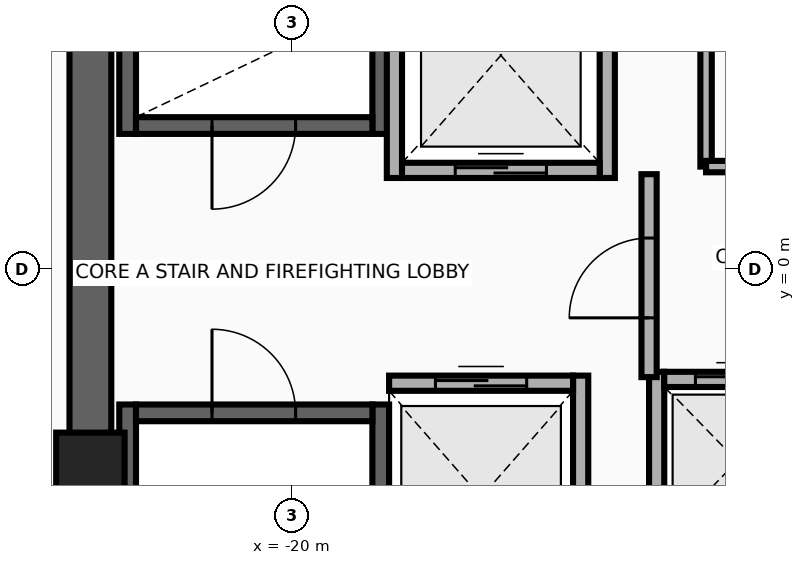
"""IFC4 building model, lengths in metres.
Left out: names, types, materials, properties, quantities, classifications, styles, units other than length and angle.
Written with IfcOpenShell. Run it as: python <this file> out.ifc"""

import sys

from ifc_helpers import new_model, si_unit, direction, frame, frame_2d, origin, origin_2d, place, context, subcontext, project, spatial, rectangle, extrude, source, transform, mapped, element, fill, save


model = new_model("IFC4")
c1 = context("Model", 3, precision=1e-05, world=origin(), true_north=direction((0.0, 1.0)))
c2 = subcontext(c1, "Body", "Model", "MODEL_VIEW")
j1 = project(units=[si_unit("LENGTHUNIT", "METRE"), si_unit("PLANEANGLEUNIT", "RADIAN")], contexts=[c1])
p1 = place(None, origin())
s1 = spatial("IfcSite", under=j1, at=p1, CompositionType="ELEMENT")
p2 = place(p1, origin())
s2 = spatial("IfcBuilding", under=s1, at=p2, CompositionType="ELEMENT")
p3 = place(p2, frame((0.0, 0.0, 209.0)))
s3 = spatial("IfcBuildingStorey", under=s2, at=p3, CompositionType="ELEMENT", Elevation=209.0)
for number, where, z_axis, x_axis in (
    (1, (-22.16, 1.78, 0.0), (0.0, 0.0, 1.0), (0.0, 1.0, 0.0)),
    (2, (-18.83, 1.78, 0.0), (0.0, 0.0, 1.0), (0.0, 1.0, 0.0)),
):
    element("IfcWall", number, at=place(p3, frame(where, z_axis=z_axis, x_axis=x_axis)), inside=s3, PredefinedType="SHEAR", context=c2, shape_type="SweptSolid", body=[
        extrude(rectangle(XDim=8.745, YDim=0.22, at=frame_2d((4.373, 0.0))), origin(), (0.0, 0.0, 1.0), 3.26),
    ])
p4 = place(p3, frame((-22.05, 1.89, 0.0), z_axis=(0.0, 0.0, 1.0), x_axis=(1.0, 0.0, 0.0)))
e3 = element("IfcWall", 3, at=p4, inside=s3, PredefinedType="SHEAR", context=c2, shape_type="SweptSolid", body=[
    extrude(rectangle(XDim=3.11, YDim=0.22, at=frame_2d((1.555, 0.0))), origin(), (0.0, 0.0, 1.0), 3.26),
])
p5 = place(p4, frame((1.0, 0.0, 0.0)))
e4 = element("IfcOpeningElement", 4, at=p5, cuts=e3, PredefinedType="OPENING", context=c2, shape_type="SweptSolid", body=[
    extrude(rectangle(XDim=1.1, YDim=2.15, at=frame_2d((0.55, 1.075))), frame((0.0, 0.125, 0.0), z_axis=(0.0, -1.0, 0.0), x_axis=(1.0, 0.0, 0.0)), (0.0, 0.0, 1.0), 0.25),
])
for number, where, z_axis, x_axis in (
    (5, (-22.16, -10.525, 0.0), (0.0, 0.0, 1.0), (0.0, 1.0, 0.0)),
    (6, (-18.83, -10.525, 0.0), (0.0, 0.0, 1.0), (0.0, 1.0, 0.0)),
):
    element("IfcWall", number, at=place(p3, frame(where, z_axis=z_axis, x_axis=x_axis)), inside=s3, PredefinedType="SHEAR", context=c2, shape_type="SweptSolid", body=[
        extrude(rectangle(XDim=8.745, YDim=0.22, at=frame_2d((4.373, 0.0))), origin(), (0.0, 0.0, 1.0), 3.26),
    ])
p6 = place(p3, frame((-22.05, -1.89, 0.0), z_axis=(0.0, 0.0, 1.0), x_axis=(1.0, 0.0, 0.0)))
e7 = element("IfcWall", 7, at=p6, inside=s3, PredefinedType="SHEAR", context=c2, shape_type="SweptSolid", body=[
    extrude(rectangle(XDim=3.11, YDim=0.22, at=frame_2d((1.555, 0.0))), origin(), (0.0, 0.0, 1.0), 3.26),
])
p7 = place(p6, frame((1.0, 0.0, 0.0)))
e8 = element("IfcOpeningElement", 8, at=p7, cuts=e7, PredefinedType="OPENING", context=c2, shape_type="SweptSolid", body=[
    extrude(rectangle(XDim=1.1, YDim=2.15, at=frame_2d((0.55, 1.075))), frame((0.0, 0.125, 0.0), z_axis=(0.0, -1.0, 0.0), x_axis=(1.0, 0.0, 0.0)), (0.0, 0.0, 1.0), 0.25),
])
p8 = place(p3, frame((-22.65, -11.075, 0.0), z_axis=(0.0, 0.0, 1.0), x_axis=(0.0, 1.0, 0.0)))
e9 = element("IfcWall", 9, at=p8, inside=s3, PredefinedType="SHEAR", context=c2, shape_type="SweptSolid", body=[
    extrude(rectangle(XDim=22.15, YDim=0.55, at=frame_2d((11.075, 0.0))), origin(), (0.0, 0.0, 1.0), 3.26),
])
m1 = source(origin(), c2, "Body", "SweptSolid", [
    extrude(rectangle(XDim=0.9, YDim=0.9, at=origin_2d()), origin(), (0.0, 0.0, 1.0), 3.5),
])
p9 = place(p3, frame((-22.65, -2.6, 0.0), z_axis=(0.0, 0.0, 1.0), x_axis=(1.0, 0.0, 0.0)))
e10 = element("IfcColumn", 10, at=p9, inside=s3, PredefinedType="COLUMN", context=c2, shape_type="MappedRepresentation", body=[
    mapped(m1, transform((0.0, 0.0, 0.0), x_axis=(1.0, 0.0, 0.0), y_axis=(0.0, 1.0, 0.0), z_axis=(0.0, 0.0, 1.0), scale=1.0)),
])
for number, where, z_axis, x_axis in (
    (11, (-18.65, 1.2, 0.0), (0.0, 0.0, 1.0), (0.0, 1.0, 0.0)),
    (12, (-15.85, 1.2, 0.0), (0.0, 0.0, 1.0), (0.0, 1.0, 0.0)),
):
    element("IfcWall", number, at=place(p3, frame(where, z_axis=z_axis, x_axis=x_axis)), inside=s3, PredefinedType="MOVABLE", context=c2, shape_type="SweptSolid", body=[
        extrude(rectangle(XDim=3.225, YDim=0.2, at=frame_2d((1.613, 0.0))), origin(), (0.0, 0.0, 1.0), 3.26),
    ])
p10 = place(p3, frame((-18.55, 1.3, 0.0), z_axis=(0.0, 0.0, 1.0), x_axis=(1.0, 0.0, 0.0)))
e13 = element("IfcWall", 13, at=p10, inside=s3, PredefinedType="MOVABLE", context=c2, shape_type="SweptSolid", body=[
    extrude(rectangle(XDim=2.6, YDim=0.2, at=frame_2d((1.3, 0.0))), origin(), (0.0, 0.0, 1.0), 3.26),
])
p11 = place(p10, frame((0.7, 0.0, 0.0)))
e14 = element("IfcOpeningElement", 14, at=p11, cuts=e13, PredefinedType="OPENING", context=c2, shape_type="SweptSolid", body=[
    extrude(rectangle(XDim=1.2, YDim=2.1, at=frame_2d((0.6, 1.05))), frame((0.0, 0.115, 0.0), z_axis=(0.0, -1.0, 0.0), x_axis=(1.0, 0.0, 0.0)), (0.0, 0.0, 1.0), 0.23),
])
p12 = place(p3, frame((-16.2, -4.6, 0.0), z_axis=(0.0, 0.0, 1.0), x_axis=(0.0, 1.0, 0.0)))
e15 = element("IfcWall", 15, at=p12, inside=s3, PredefinedType="MOVABLE", context=c2, shape_type="SweptSolid", body=[
    extrude(rectangle(XDim=3.2, YDim=0.2, at=frame_2d((1.6, 0.0))), origin(), (0.0, 0.0, 1.0), 3.26),
])
p13 = place(p3, frame((-18.72, -1.5, 0.0), z_axis=(0.0, 0.0, 1.0), x_axis=(1.0, 0.0, 0.0)))
e16 = element("IfcWall", 16, at=p13, inside=s3, PredefinedType="MOVABLE", context=c2, shape_type="SweptSolid", body=[
    extrude(rectangle(XDim=2.42, YDim=0.2, at=frame_2d((1.21, 0.0))), origin(), (0.0, 0.0, 1.0), 3.26),
])
p14 = place(p13, frame((0.61, 0.0, 0.0)))
e17 = element("IfcOpeningElement", 17, at=p14, cuts=e16, PredefinedType="OPENING", context=c2, shape_type="SweptSolid", body=[
    extrude(rectangle(XDim=1.2, YDim=2.1, at=frame_2d((0.6, 1.05))), frame((0.0, 0.115, 0.0), z_axis=(0.0, -1.0, 0.0), x_axis=(1.0, 0.0, 0.0)), (0.0, 0.0, 1.0), 0.23),
])
p15 = place(p3, frame((-15.2, -3.7, 0.0), z_axis=(0.0, 0.0, 1.0), x_axis=(0.0, 1.0, 0.0)))
e18 = element("IfcWall", 18, at=p15, inside=s3, PredefinedType="MOVABLE", context=c2, shape_type="SweptSolid", body=[
    extrude(rectangle(XDim=2.35, YDim=0.2, at=frame_2d((1.175, 0.0))), origin(), (0.0, 0.0, 1.0), 3.26),
])
p16 = place(p3, frame((-15.1, -1.45, 0.0), z_axis=(0.0, 0.0, 1.0), x_axis=(1.0, 0.0, 0.0)))
e19 = element("IfcWall", 19, at=p16, inside=s3, PredefinedType="MOVABLE", context=c2, shape_type="SweptSolid", body=[
    extrude(rectangle(XDim=1.92, YDim=0.2, at=frame_2d((0.96, 0.0))), origin(), (0.0, 0.0, 1.0), 3.26),
])
p17 = place(p16, frame((0.41, 0.0, 0.0)))
e20 = element("IfcOpeningElement", 20, at=p17, cuts=e19, PredefinedType="OPENING", context=c2, shape_type="SweptSolid", body=[
    extrude(rectangle(XDim=1.1, YDim=2.1, at=frame_2d((0.55, 1.05))), frame((0.0, 0.115, 0.0), z_axis=(0.0, -1.0, 0.0), x_axis=(1.0, 0.0, 0.0)), (0.0, 0.0, 1.0), 0.23),
])
p18 = place(p3, frame((-15.3, -1.42, 0.0), z_axis=(0.0, 0.0, 1.0), x_axis=(0.0, 1.0, 0.0)))
e21 = element("IfcWall", 21, at=p18, inside=s3, PredefinedType="PARTITIONING", context=c2, shape_type="SweptSolid", body=[
    extrude(rectangle(XDim=2.67, YDim=0.2, at=frame_2d((1.335, 0.0))), origin(), (0.0, 0.0, 1.0), 3.26),
])
p19 = place(p18, frame((0.78, 0.0, 0.0)))
e22 = element("IfcOpeningElement", 22, at=p19, cuts=e21, PredefinedType="OPENING", context=c2, shape_type="SweptSolid", body=[
    extrude(rectangle(XDim=1.05, YDim=2.15, at=frame_2d((0.525, 1.075))), frame((0.0, 0.115, 0.0), z_axis=(0.0, -1.0, 0.0), x_axis=(1.0, 0.0, 0.0)), (0.0, 0.0, 1.0), 0.23),
])
p20 = place(p3, frame((-14.55, 1.35, 0.0), z_axis=(0.0, 0.0, 1.0), x_axis=(0.0, 1.0, 0.0)))
e23 = element("IfcWall", 23, at=p20, inside=s3, PredefinedType="PARTITIONING", context=c2, shape_type="SweptSolid", body=[
    extrude(rectangle(XDim=1.95, YDim=0.15, at=frame_2d((0.975, 0.0))), origin(), (0.0, 0.0, 1.0), 3.26),
])
p21 = place(p3, frame((-14.55, 1.35, 0.0), z_axis=(0.0, 0.0, 1.0), x_axis=(1.0, 0.0, 0.0)))
e24 = element("IfcWall", 24, at=p21, inside=s3, PredefinedType="PARTITIONING", context=c2, shape_type="SweptSolid", body=[
    extrude(rectangle(XDim=1.4, YDim=0.15, at=frame_2d((0.7, 0.0))), origin(), (0.0, 0.0, 1.0), 3.26),
])
p22 = place(p21, frame((0.275, 0.0, 0.0)))
e25 = element("IfcOpeningElement", 25, at=p22, cuts=e24, PredefinedType="OPENING", context=c2, shape_type="SweptSolid", body=[
    extrude(rectangle(XDim=0.85, YDim=2.05, at=frame_2d((0.425, 1.025))), frame((0.0, 0.09, 0.0), z_axis=(0.0, -1.0, 0.0), x_axis=(1.0, 0.0, 0.0)), (0.0, 0.0, 1.0), 0.18),
])
p23 = place(p11, origin())
e26 = element("IfcDoor", 26, at=p23, inside=s3, OperationType="DOUBLE_DOOR_SLIDING", PredefinedType="DOOR", context=c2, shape_type="SweptSolid", body=[
    extrude(rectangle(XDim=1.2, YDim=2.1, at=frame_2d((0.6, 1.05))), frame((0.0, 0.025, 0.0), z_axis=(0.0, -1.0, 0.0), x_axis=(1.0, 0.0, 0.0)), (0.0, 0.0, 1.0), 0.05),
])
fill(e14, e26)
p24 = place(p14, origin())
e27 = element("IfcDoor", 27, at=p24, inside=s3, OperationType="DOUBLE_DOOR_SLIDING", PredefinedType="DOOR", context=c2, shape_type="SweptSolid", body=[
    extrude(rectangle(XDim=1.2, YDim=2.1, at=frame_2d((0.6, 1.05))), frame((0.0, 0.025, 0.0), z_axis=(0.0, -1.0, 0.0), x_axis=(1.0, 0.0, 0.0)), (0.0, 0.0, 1.0), 0.05),
])
fill(e17, e27)
p25 = place(p17, origin())
e28 = element("IfcDoor", 28, at=p25, inside=s3, OperationType="DOUBLE_DOOR_SLIDING", PredefinedType="DOOR", context=c2, shape_type="SweptSolid", body=[
    extrude(rectangle(XDim=1.1, YDim=2.1, at=frame_2d((0.55, 1.05))), frame((0.0, 0.025, 0.0), z_axis=(0.0, -1.0, 0.0), x_axis=(1.0, 0.0, 0.0)), (0.0, 0.0, 1.0), 0.05),
])
fill(e20, e28)
p26 = place(p19, origin())
e29 = element("IfcDoor", 29, at=p26, inside=s3, OperationType="SINGLE_SWING_RIGHT", PredefinedType="DOOR", context=c2, shape_type="SweptSolid", body=[
    extrude(rectangle(XDim=1.05, YDim=2.15, at=frame_2d((0.525, 1.075))), frame((0.0, 0.025, 0.0), z_axis=(0.0, -1.0, 0.0), x_axis=(1.0, 0.0, 0.0)), (0.0, 0.0, 1.0), 0.05),
])
fill(e22, e29)
p27 = place(p5, frame((1.1, 0.0, 0.0), z_axis=(0.0, 0.0, 1.0), x_axis=(-1.0, 0.0, 0.0)))
e30 = element("IfcDoor", 30, at=p27, inside=s3, OperationType="SINGLE_SWING_LEFT", PredefinedType="DOOR", context=c2, shape_type="SweptSolid", body=[
    extrude(rectangle(XDim=1.1, YDim=2.15, at=frame_2d((0.55, 1.075))), frame((0.0, 0.025, 0.0), z_axis=(0.0, -1.0, 0.0), x_axis=(1.0, 0.0, 0.0)), (0.0, 0.0, 1.0), 0.05),
])
fill(e4, e30)
p28 = place(p7, origin())
e31 = element("IfcDoor", 31, at=p28, inside=s3, OperationType="SINGLE_SWING_RIGHT", PredefinedType="DOOR", context=c2, shape_type="SweptSolid", body=[
    extrude(rectangle(XDim=1.1, YDim=2.15, at=frame_2d((0.55, 1.075))), frame((0.0, 0.025, 0.0), z_axis=(0.0, -1.0, 0.0), x_axis=(1.0, 0.0, 0.0)), (0.0, 0.0, 1.0), 0.05),
])
fill(e8, e31)
save(model, sys.argv[1])
